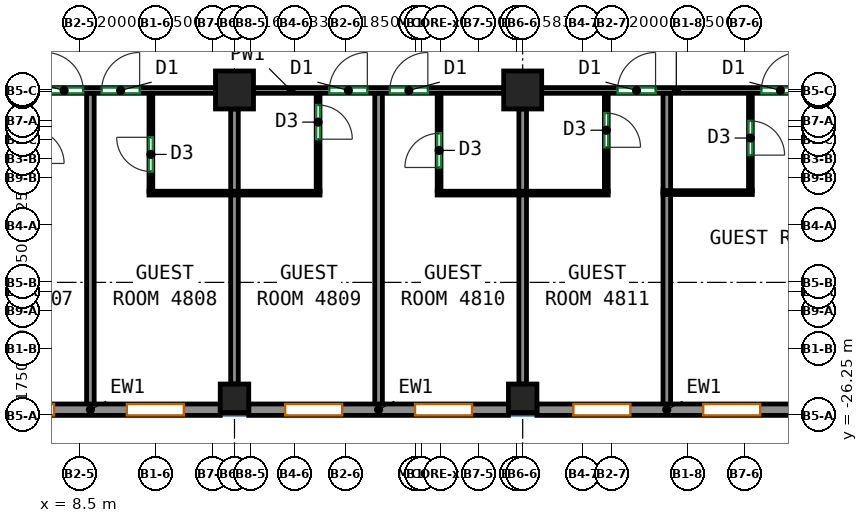
"""IFC4 building model, lengths in metres.
Left out: names, types, materials, properties, quantities, classifications, styles, units other than length and angle.
Written with IfcOpenShell. Run it as: python <this file> out.ifc"""

import sys

from ifc_helpers import new_model, si_unit, direction, frame, frame_2d, origin, origin_2d, place, context, subcontext, project, spatial, rectangle, extrude, source, transform, mapped, element, fill, save


model = new_model("IFC4")
c1 = context("Model", 3, precision=1e-05, world=origin(), true_north=direction((0.0, 1.0)))
c2 = subcontext(c1, "Body", "Model", "MODEL_VIEW")
j1 = project(units=[si_unit("LENGTHUNIT", "METRE"), si_unit("PLANEANGLEUNIT", "RADIAN")], contexts=[c1])
p1 = place(None, origin())
s1 = spatial("IfcSite", under=j1, at=p1, CompositionType="ELEMENT")
p2 = place(p1, origin())
s2 = spatial("IfcBuilding", under=s1, at=p2, CompositionType="ELEMENT")
p3 = place(p2, frame((0.0, 0.0, 199.9)))
s3 = spatial("IfcBuildingStorey", under=s2, at=p3, CompositionType="ELEMENT", Elevation=199.9)
m1 = source(origin(), c2, "Body", "SweptSolid", [
    extrude(rectangle(XDim=0.75, YDim=0.75, at=origin_2d()), origin(), (0.0, 0.0, 1.0), 3.12),
])
p4 = place(p3, frame((12.583, -25.8, 0.0), z_axis=(0.0, 0.0, 1.0), x_axis=(1.0, 0.0, 0.0)))
e1 = element("IfcColumn", 1, at=p4, inside=s3, PredefinedType="COLUMN", context=c2, shape_type="MappedRepresentation", body=[
    mapped(m1, transform((0.0, 0.0, 0.0))),
])
m2 = source(origin(), c2, "Body", "SweptSolid", [
    extrude(rectangle(XDim=1.0, YDim=1.0, at=origin_2d()), origin(), (0.0, 0.0, 1.0), 3.12),
])
p5 = place(p3, frame((12.583, -17.688, 0.0), z_axis=(0.0, 0.0, 1.0), x_axis=(1.0, 0.0, 0.0)))
e2 = element("IfcColumn", 2, at=p5, inside=s3, PredefinedType="COLUMN", context=c2, shape_type="MappedRepresentation", body=[
    mapped(m2, transform((0.0, 0.0, 0.0))),
])
p6 = place(p3, frame((20.167, -25.8, 0.0), z_axis=(0.0, 0.0, 1.0), x_axis=(1.0, 0.0, 0.0)))
e3 = element("IfcColumn", 3, at=p6, inside=s3, PredefinedType="COLUMN", context=c2, shape_type="MappedRepresentation", body=[
    mapped(m1, transform((0.0, 0.0, 0.0))),
])
p7 = place(p3, frame((20.167, -17.688, 0.0), z_axis=(0.0, 0.0, 1.0), x_axis=(1.0, 0.0, 0.0)))
e4 = element("IfcColumn", 4, at=p7, inside=s3, PredefinedType="COLUMN", context=c2, shape_type="MappedRepresentation", body=[
    mapped(m2, transform((0.0, 0.0, 0.0))),
])
m3 = source(origin(), c2, "Body", "SweptSolid", [
    extrude(rectangle(XDim=6.833, YDim=0.3, at=frame_2d((3.417, 0.0))), origin(), (0.0, 0.0, 1.0), 3.12),
])
p8 = place(p3, frame((5.375, -26.1, 0.0), z_axis=(0.0, 0.0, 1.0), x_axis=(1.0, 0.0, 0.0)))
e5 = element("IfcWall", 5, at=p8, inside=s3, PredefinedType="SOLIDWALL", context=c2, shape_type="MappedRepresentation", body=[
    mapped(m3, transform((0.0, 0.0, 0.0))),
])
p9 = place(p8, frame((0.958, 0.0, 0.85)))
e6 = element("IfcOpeningElement", 6, at=p9, cuts=e5, PredefinedType="OPENING", context=c2, shape_type="SweptSolid", body=[
    extrude(rectangle(XDim=1.5, YDim=1.95, at=frame_2d((0.75, 0.975))), frame((0.0, 0.16, 0.0), z_axis=(0.0, -1.0, 0.0), x_axis=(1.0, 0.0, 0.0)), (0.0, 0.0, 1.0), 0.32),
])
p10 = place(p8, frame((4.375, 0.0, 0.85)))
e7 = element("IfcOpeningElement", 7, at=p10, cuts=e5, PredefinedType="OPENING", context=c2, shape_type="SweptSolid", body=[
    extrude(rectangle(XDim=1.5, YDim=1.95, at=frame_2d((0.75, 0.975))), frame((0.0, 0.16, 0.0), z_axis=(0.0, -1.0, 0.0), x_axis=(1.0, 0.0, 0.0)), (0.0, 0.0, 1.0), 0.32),
])
m4 = source(origin(), c2, "Body", "SweptSolid", [
    extrude(rectangle(XDim=6.833, YDim=0.3, at=frame_2d((3.417, 0.0))), origin(), (0.0, 0.0, 1.0), 3.12),
])
p11 = place(p3, frame((12.958, -26.1, 0.0), z_axis=(0.0, 0.0, 1.0), x_axis=(1.0, 0.0, 0.0)))
e8 = element("IfcWall", 8, at=p11, inside=s3, PredefinedType="SOLIDWALL", context=c2, shape_type="MappedRepresentation", body=[
    mapped(m4, transform((0.0, 0.0, 0.0))),
])
p12 = place(p11, frame((0.958, 0.0, 0.85)))
e9 = element("IfcOpeningElement", 9, at=p12, cuts=e8, PredefinedType="OPENING", context=c2, shape_type="SweptSolid", body=[
    extrude(rectangle(XDim=1.5, YDim=1.95, at=frame_2d((0.75, 0.975))), frame((0.0, 0.16, 0.0), z_axis=(0.0, -1.0, 0.0), x_axis=(1.0, 0.0, 0.0)), (0.0, 0.0, 1.0), 0.32),
])
p13 = place(p11, frame((4.375, 0.0, 0.85)))
e10 = element("IfcOpeningElement", 10, at=p13, cuts=e8, PredefinedType="OPENING", context=c2, shape_type="SweptSolid", body=[
    extrude(rectangle(XDim=1.5, YDim=1.95, at=frame_2d((0.75, 0.975))), frame((0.0, 0.16, 0.0), z_axis=(0.0, -1.0, 0.0), x_axis=(1.0, 0.0, 0.0)), (0.0, 0.0, 1.0), 0.32),
])
p14 = place(p3, frame((20.542, -26.1, 0.0), z_axis=(0.0, 0.0, 1.0), x_axis=(1.0, 0.0, 0.0)))
e11 = element("IfcWall", 11, at=p14, inside=s3, PredefinedType="SOLIDWALL", context=c2, shape_type="MappedRepresentation", body=[
    mapped(m3, transform((0.0, 0.0, 0.0))),
])
p15 = place(p14, frame((0.958, 0.0, 0.85)))
e12 = element("IfcOpeningElement", 12, at=p15, cuts=e11, PredefinedType="OPENING", context=c2, shape_type="SweptSolid", body=[
    extrude(rectangle(XDim=1.5, YDim=1.95, at=frame_2d((0.75, 0.975))), frame((0.0, 0.16, 0.0), z_axis=(0.0, -1.0, 0.0), x_axis=(1.0, 0.0, 0.0)), (0.0, 0.0, 1.0), 0.32),
])
p16 = place(p14, frame((4.375, 0.0, 0.85)))
e13 = element("IfcOpeningElement", 13, at=p16, cuts=e11, PredefinedType="OPENING", context=c2, shape_type="SweptSolid", body=[
    extrude(rectangle(XDim=1.5, YDim=1.95, at=frame_2d((0.75, 0.975))), frame((0.0, 0.16, 0.0), z_axis=(0.0, -1.0, 0.0), x_axis=(1.0, 0.0, 0.0)), (0.0, 0.0, 1.0), 0.32),
])
p17 = place(p3, frame((5.5, -17.7, 0.0), z_axis=(0.0, 0.0, 1.0), x_axis=(1.0, 0.0, 0.0)))
e14 = element("IfcWall", 14, at=p17, inside=s3, PredefinedType="PARTITIONING", context=c2, shape_type="SweptSolid", body=[
    extrude(rectangle(XDim=6.583, YDim=0.15, at=frame_2d((3.292, 0.0))), origin(), (0.0, 0.0, 1.0), 3.12),
])
p18 = place(p17, frame((2.101, 0.0, 0.0)))
e15 = element("IfcOpeningElement", 15, at=p18, cuts=e14, PredefinedType="OPENING", context=c2, shape_type="SweptSolid", body=[
    extrude(rectangle(XDim=1.0, YDim=2.1, at=frame_2d((0.5, 1.05))), frame((0.0, 0.085, 0.0), z_axis=(0.0, -1.0, 0.0), x_axis=(1.0, 0.0, 0.0)), (0.0, 0.0, 1.0), 0.17),
])
p19 = place(p17, frame((3.587, 0.0, 0.0)))
e16 = element("IfcOpeningElement", 16, at=p19, cuts=e14, PredefinedType="OPENING", context=c2, shape_type="SweptSolid", body=[
    extrude(rectangle(XDim=1.0, YDim=2.1, at=frame_2d((0.5, 1.05))), frame((0.0, 0.085, 0.0), z_axis=(0.0, -1.0, 0.0), x_axis=(1.0, 0.0, 0.0)), (0.0, 0.0, 1.0), 0.17),
])
p20 = place(p3, frame((13.083, -17.7, 0.0), z_axis=(0.0, 0.0, 1.0), x_axis=(1.0, 0.0, 0.0)))
e17 = element("IfcWall", 17, at=p20, inside=s3, PredefinedType="PARTITIONING", context=c2, shape_type="SweptSolid", body=[
    extrude(rectangle(XDim=6.584, YDim=0.15, at=frame_2d((3.292, 0.0))), origin(), (0.0, 0.0, 1.0), 3.12),
])
p21 = place(p20, frame((1.996, 0.0, 0.0)))
e18 = element("IfcOpeningElement", 18, at=p21, cuts=e17, PredefinedType="OPENING", context=c2, shape_type="SweptSolid", body=[
    extrude(rectangle(XDim=1.0, YDim=2.1, at=frame_2d((0.5, 1.05))), frame((0.0, 0.085, 0.0), z_axis=(0.0, -1.0, 0.0), x_axis=(1.0, 0.0, 0.0)), (0.0, 0.0, 1.0), 0.17),
])
p22 = place(p20, frame((3.588, 0.0, 0.0)))
e19 = element("IfcOpeningElement", 19, at=p22, cuts=e17, PredefinedType="OPENING", context=c2, shape_type="SweptSolid", body=[
    extrude(rectangle(XDim=1.0, YDim=2.1, at=frame_2d((0.5, 1.05))), frame((0.0, 0.085, 0.0), z_axis=(0.0, -1.0, 0.0), x_axis=(1.0, 0.0, 0.0)), (0.0, 0.0, 1.0), 0.17),
])
p23 = place(p3, frame((20.667, -17.7, 0.0), z_axis=(0.0, 0.0, 1.0), x_axis=(1.0, 0.0, 0.0)))
e20 = element("IfcWall", 20, at=p23, inside=s3, PredefinedType="PARTITIONING", context=c2, shape_type="SweptSolid", body=[
    extrude(rectangle(XDim=7.083, YDim=0.15, at=frame_2d((3.542, 0.0))), origin(), (0.0, 0.0, 1.0), 2.52),
])
p24 = place(p23, frame((1.996, 0.0, 0.0)))
e21 = element("IfcOpeningElement", 21, at=p24, cuts=e20, PredefinedType="OPENING", context=c2, shape_type="SweptSolid", body=[
    extrude(rectangle(XDim=1.0, YDim=2.1, at=frame_2d((0.5, 1.05))), frame((0.0, 0.085, 0.0), z_axis=(0.0, -1.0, 0.0), x_axis=(1.0, 0.0, 0.0)), (0.0, 0.0, 1.0), 0.17),
])
p25 = place(p23, frame((5.782, 0.0, 0.0)))
e22 = element("IfcOpeningElement", 22, at=p25, cuts=e20, PredefinedType="OPENING", context=c2, shape_type="SweptSolid", body=[
    extrude(rectangle(XDim=1.0, YDim=2.1, at=frame_2d((0.5, 1.05))), frame((0.0, 0.085, 0.0), z_axis=(0.0, -1.0, 0.0), x_axis=(1.0, 0.0, 0.0)), (0.0, 0.0, 1.0), 0.17),
])
p26 = place(p3, frame((8.791, -26.0, 0.0), z_axis=(0.0, 0.0, 1.0), x_axis=(0.0, 1.0, 0.0)))
e23 = element("IfcWall", 23, at=p26, inside=s3, PredefinedType="PARTITIONING", context=c2, shape_type="SweptSolid", body=[
    extrude(rectangle(XDim=8.223, YDim=0.2, at=frame_2d((4.111, 0.0))), origin(), (0.0, 0.0, 1.0), 3.12),
])
p27 = place(p3, frame((10.383, -20.352, 0.0), z_axis=(0.0, 0.0, 1.0), x_axis=(0.0, 1.0, 0.0)))
e24 = element("IfcWall", 24, at=p27, inside=s3, PredefinedType="PARTITIONING", context=c2, shape_type="SweptSolid", body=[
    extrude(rectangle(XDim=2.575, YDim=0.1, at=frame_2d((1.288, 0.0))), origin(), (0.0, 0.0, 1.0), 3.12),
])
p28 = place(p27, frame((0.519, 0.0, 0.0)))
e25 = element("IfcOpeningElement", 25, at=p28, cuts=e24, PredefinedType="OPENING", context=c2, shape_type="SweptSolid", body=[
    extrude(rectangle(XDim=0.9, YDim=2.1, at=frame_2d((0.45, 1.05))), frame((0.0, 0.06, 0.0), z_axis=(0.0, -1.0, 0.0), x_axis=(1.0, 0.0, 0.0)), (0.0, 0.0, 1.0), 0.12),
])
p29 = place(p3, frame((10.333, -20.402, 0.0), z_axis=(0.0, 0.0, 1.0), x_axis=(1.0, 0.0, 0.0)))
e26 = element("IfcWall", 26, at=p29, inside=s3, PredefinedType="PARTITIONING", context=c2, shape_type="SweptSolid", body=[
    extrude(rectangle(XDim=4.5, YDim=0.1, at=frame_2d((2.25, 0.0))), origin(), (0.0, 0.0, 1.0), 3.12),
])
p30 = place(p3, frame((12.583, -25.425, 0.0), z_axis=(0.0, 0.0, 1.0), x_axis=(0.0, 1.0, 0.0)))
e27 = element("IfcWall", 27, at=p30, inside=s3, PredefinedType="PARTITIONING", context=c2, shape_type="SweptSolid", body=[
    extrude(rectangle(XDim=4.973, YDim=0.2, at=frame_2d((2.487, 0.0))), origin(), (0.0, 0.0, 1.0), 3.12),
])
p31 = place(p3, frame((12.583, -20.352, 0.0), z_axis=(0.0, 0.0, 1.0), x_axis=(0.0, 1.0, 0.0)))
e28 = element("IfcWall", 28, at=p31, inside=s3, PredefinedType="PARTITIONING", context=c2, shape_type="SweptSolid", body=[
    extrude(rectangle(XDim=2.164, YDim=0.2, at=frame_2d((1.082, 0.0))), origin(), (0.0, 0.0, 1.0), 3.12),
])
p32 = place(p3, frame((14.783, -17.777, 0.0), z_axis=(0.0, 0.0, 1.0), x_axis=(0.0, -1.0, 0.0)))
e29 = element("IfcWall", 29, at=p32, inside=s3, PredefinedType="PARTITIONING", context=c2, shape_type="SweptSolid", body=[
    extrude(rectangle(XDim=2.575, YDim=0.1, at=frame_2d((1.288, 0.0))), origin(), (0.0, 0.0, 1.0), 3.12),
])
p33 = place(p32, frame((0.306, 0.0, 0.0)))
e30 = element("IfcOpeningElement", 30, at=p33, cuts=e29, PredefinedType="OPENING", context=c2, shape_type="SweptSolid", body=[
    extrude(rectangle(XDim=0.9, YDim=2.1, at=frame_2d((0.45, 1.05))), frame((0.0, 0.06, 0.0), z_axis=(0.0, -1.0, 0.0), x_axis=(1.0, 0.0, 0.0)), (0.0, 0.0, 1.0), 0.12),
])
p34 = place(p3, frame((16.375, -26.0, 0.0), z_axis=(0.0, 0.0, 1.0), x_axis=(0.0, 1.0, 0.0)))
e31 = element("IfcWall", 31, at=p34, inside=s3, PredefinedType="PARTITIONING", context=c2, shape_type="SweptSolid", body=[
    extrude(rectangle(XDim=8.223, YDim=0.2, at=frame_2d((4.111, 0.0))), origin(), (0.0, 0.0, 1.0), 3.12),
])
p35 = place(p3, frame((17.967, -20.352, 0.0), z_axis=(0.0, 0.0, 1.0), x_axis=(0.0, 1.0, 0.0)))
e32 = element("IfcWall", 32, at=p35, inside=s3, PredefinedType="PARTITIONING", context=c2, shape_type="SweptSolid", body=[
    extrude(rectangle(XDim=2.575, YDim=0.1, at=frame_2d((1.288, 0.0))), origin(), (0.0, 0.0, 1.0), 3.12),
])
p36 = place(p35, frame((0.625, 0.0, 0.0)))
e33 = element("IfcOpeningElement", 33, at=p36, cuts=e32, PredefinedType="OPENING", context=c2, shape_type="SweptSolid", body=[
    extrude(rectangle(XDim=0.9, YDim=2.1, at=frame_2d((0.45, 1.05))), frame((0.0, 0.06, 0.0), z_axis=(0.0, -1.0, 0.0), x_axis=(1.0, 0.0, 0.0)), (0.0, 0.0, 1.0), 0.12),
])
p37 = place(p3, frame((17.917, -20.402, 0.0), z_axis=(0.0, 0.0, 1.0), x_axis=(1.0, 0.0, 0.0)))
e34 = element("IfcWall", 34, at=p37, inside=s3, PredefinedType="PARTITIONING", context=c2, shape_type="SweptSolid", body=[
    extrude(rectangle(XDim=4.5, YDim=0.1, at=frame_2d((2.25, 0.0))), origin(), (0.0, 0.0, 1.0), 3.12),
])
p38 = place(p3, frame((20.167, -25.425, 0.0), z_axis=(0.0, 0.0, 1.0), x_axis=(0.0, 1.0, 0.0)))
e35 = element("IfcWall", 35, at=p38, inside=s3, PredefinedType="PARTITIONING", context=c2, shape_type="SweptSolid", body=[
    extrude(rectangle(XDim=4.973, YDim=0.2, at=frame_2d((2.487, 0.0))), origin(), (0.0, 0.0, 1.0), 3.12),
])
p39 = place(p3, frame((20.167, -20.352, 0.0), z_axis=(0.0, 0.0, 1.0), x_axis=(0.0, 1.0, 0.0)))
e36 = element("IfcWall", 36, at=p39, inside=s3, PredefinedType="PARTITIONING", context=c2, shape_type="SweptSolid", body=[
    extrude(rectangle(XDim=2.164, YDim=0.2, at=frame_2d((1.082, 0.0))), origin(), (0.0, 0.0, 1.0), 3.12),
])
p40 = place(p3, frame((22.367, -17.777, 0.0), z_axis=(0.0, 0.0, 1.0), x_axis=(0.0, -1.0, 0.0)))
e37 = element("IfcWall", 37, at=p40, inside=s3, PredefinedType="PARTITIONING", context=c2, shape_type="SweptSolid", body=[
    extrude(rectangle(XDim=2.575, YDim=0.1, at=frame_2d((1.288, 0.0))), origin(), (0.0, 0.0, 1.0), 3.12),
])
p41 = place(p40, frame((0.519, 0.0, 0.0)))
e38 = element("IfcOpeningElement", 38, at=p41, cuts=e37, PredefinedType="OPENING", context=c2, shape_type="SweptSolid", body=[
    extrude(rectangle(XDim=0.9, YDim=2.1, at=frame_2d((0.45, 1.05))), frame((0.0, 0.06, 0.0), z_axis=(0.0, -1.0, 0.0), x_axis=(1.0, 0.0, 0.0)), (0.0, 0.0, 1.0), 0.12),
])
p42 = place(p3, frame((23.959, -26.0, 0.0), z_axis=(0.0, 0.0, 1.0), x_axis=(0.0, 1.0, 0.0)))
e39 = element("IfcWall", 39, at=p42, inside=s3, PredefinedType="PARTITIONING", context=c2, shape_type="SweptSolid", body=[
    extrude(rectangle(XDim=5.572, YDim=0.2, at=frame_2d((2.786, 0.0))), origin(), (0.0, 0.0, 1.0), 3.12),
])
p43 = place(p3, frame((23.959, -20.348, 0.0), z_axis=(0.0, 0.0, 1.0), x_axis=(0.0, 1.0, 0.0)))
e40 = element("IfcWall", 40, at=p43, inside=s3, PredefinedType="PARTITIONING", context=c2, shape_type="SweptSolid", body=[
    extrude(rectangle(XDim=2.571, YDim=0.2, at=frame_2d((1.285, 0.0))), origin(), (0.0, 0.0, 1.0), 3.12),
])
p44 = place(p3, frame((23.859, -20.388, 0.0), z_axis=(0.0, 0.0, 1.0), x_axis=(1.0, 0.0, 0.0)))
e41 = element("IfcWall", 41, at=p44, inside=s3, PredefinedType="PARTITIONING", context=c2, shape_type="SweptSolid", body=[
    extrude(rectangle(XDim=2.35, YDim=0.1, at=frame_2d((1.175, 0.0))), origin(), (0.0, 0.0, 1.0), 3.12),
])
p45 = place(p3, frame((26.159, -17.777, 0.0), z_axis=(0.0, 0.0, 1.0), x_axis=(0.0, -1.0, 0.0)))
e42 = element("IfcWall", 42, at=p45, inside=s3, PredefinedType="PARTITIONING", context=c2, shape_type="SweptSolid", body=[
    extrude(rectangle(XDim=2.561, YDim=0.1, at=frame_2d((1.28, 0.0))), origin(), (0.0, 0.0, 1.0), 3.12),
])
p46 = place(p45, frame((0.725, 0.0, 0.0)))
e43 = element("IfcOpeningElement", 43, at=p46, cuts=e42, PredefinedType="OPENING", context=c2, shape_type="SweptSolid", body=[
    extrude(rectangle(XDim=0.9, YDim=2.1, at=frame_2d((0.45, 1.05))), frame((0.0, 0.06, 0.0), z_axis=(0.0, -1.0, 0.0), x_axis=(1.0, 0.0, 0.0)), (0.0, 0.0, 1.0), 0.12),
])
p47 = place(p9, origin())
e44 = element("IfcWindow", 44, at=p47, inside=s3, PartitioningType="SINGLE_PANEL", PredefinedType="WINDOW", context=c2, shape_type="SweptSolid", body=[
    extrude(rectangle(XDim=1.5, YDim=1.95, at=frame_2d((0.75, 0.975))), frame((0.0, 0.03, 0.0), z_axis=(0.0, -1.0, 0.0), x_axis=(1.0, 0.0, 0.0)), (0.0, 0.0, 1.0), 0.06),
])
fill(e6, e44)
p48 = place(p10, origin())
e45 = element("IfcWindow", 45, at=p48, inside=s3, PartitioningType="SINGLE_PANEL", PredefinedType="WINDOW", context=c2, shape_type="SweptSolid", body=[
    extrude(rectangle(XDim=1.5, YDim=1.95, at=frame_2d((0.75, 0.975))), frame((0.0, 0.03, 0.0), z_axis=(0.0, -1.0, 0.0), x_axis=(1.0, 0.0, 0.0)), (0.0, 0.0, 1.0), 0.06),
])
fill(e7, e45)
p49 = place(p12, origin())
e46 = element("IfcWindow", 46, at=p49, inside=s3, PartitioningType="SINGLE_PANEL", PredefinedType="WINDOW", context=c2, shape_type="SweptSolid", body=[
    extrude(rectangle(XDim=1.5, YDim=1.95, at=frame_2d((0.75, 0.975))), frame((0.0, 0.03, 0.0), z_axis=(0.0, -1.0, 0.0), x_axis=(1.0, 0.0, 0.0)), (0.0, 0.0, 1.0), 0.06),
])
fill(e9, e46)
p50 = place(p13, origin())
e47 = element("IfcWindow", 47, at=p50, inside=s3, PartitioningType="SINGLE_PANEL", PredefinedType="WINDOW", context=c2, shape_type="SweptSolid", body=[
    extrude(rectangle(XDim=1.5, YDim=1.95, at=frame_2d((0.75, 0.975))), frame((0.0, 0.03, 0.0), z_axis=(0.0, -1.0, 0.0), x_axis=(1.0, 0.0, 0.0)), (0.0, 0.0, 1.0), 0.06),
])
fill(e10, e47)
p51 = place(p15, origin())
e48 = element("IfcWindow", 48, at=p51, inside=s3, PartitioningType="SINGLE_PANEL", PredefinedType="WINDOW", context=c2, shape_type="SweptSolid", body=[
    extrude(rectangle(XDim=1.5, YDim=1.95, at=frame_2d((0.75, 0.975))), frame((0.0, 0.03, 0.0), z_axis=(0.0, -1.0, 0.0), x_axis=(1.0, 0.0, 0.0)), (0.0, 0.0, 1.0), 0.06),
])
fill(e12, e48)
p52 = place(p16, origin())
e49 = element("IfcWindow", 49, at=p52, inside=s3, PartitioningType="SINGLE_PANEL", PredefinedType="WINDOW", context=c2, shape_type="SweptSolid", body=[
    extrude(rectangle(XDim=1.5, YDim=1.95, at=frame_2d((0.75, 0.975))), frame((0.0, 0.03, 0.0), z_axis=(0.0, -1.0, 0.0), x_axis=(1.0, 0.0, 0.0)), (0.0, 0.0, 1.0), 0.06),
])
fill(e13, e49)
p53 = place(p28, origin())
e50 = element("IfcDoor", 50, at=p53, inside=s3, OperationType="SINGLE_SWING_RIGHT", PredefinedType="DOOR", context=c2, shape_type="SweptSolid", body=[
    extrude(rectangle(XDim=0.9, YDim=2.1, at=frame_2d((0.45, 1.05))), frame((0.0, 0.025, 0.0), z_axis=(0.0, -1.0, 0.0), x_axis=(1.0, 0.0, 0.0)), (0.0, 0.0, 1.0), 0.05),
])
fill(e25, e50)
p54 = place(p36, origin())
e51 = element("IfcDoor", 51, at=p54, inside=s3, OperationType="SINGLE_SWING_LEFT", PredefinedType="DOOR", context=c2, shape_type="SweptSolid", body=[
    extrude(rectangle(XDim=0.9, YDim=2.1, at=frame_2d((0.45, 1.05))), frame((0.0, 0.025, 0.0), z_axis=(0.0, -1.0, 0.0), x_axis=(1.0, 0.0, 0.0)), (0.0, 0.0, 1.0), 0.05),
])
fill(e33, e51)
p55 = place(p46, origin())
e52 = element("IfcDoor", 52, at=p55, inside=s3, OperationType="SINGLE_SWING_RIGHT", PredefinedType="DOOR", context=c2, shape_type="SweptSolid", body=[
    extrude(rectangle(XDim=0.9, YDim=2.1, at=frame_2d((0.45, 1.05))), frame((0.0, 0.025, 0.0), z_axis=(0.0, -1.0, 0.0), x_axis=(1.0, 0.0, 0.0)), (0.0, 0.0, 1.0), 0.05),
])
fill(e43, e52)
p56 = place(p41, origin())
e53 = element("IfcDoor", 53, at=p56, inside=s3, OperationType="SINGLE_SWING_RIGHT", PredefinedType="DOOR", context=c2, shape_type="SweptSolid", body=[
    extrude(rectangle(XDim=0.9, YDim=2.1, at=frame_2d((0.45, 1.05))), frame((0.0, 0.025, 0.0), z_axis=(0.0, -1.0, 0.0), x_axis=(1.0, 0.0, 0.0)), (0.0, 0.0, 1.0), 0.05),
])
fill(e38, e53)
p57 = place(p33, origin())
e54 = element("IfcDoor", 54, at=p57, inside=s3, OperationType="SINGLE_SWING_RIGHT", PredefinedType="DOOR", context=c2, shape_type="SweptSolid", body=[
    extrude(rectangle(XDim=0.9, YDim=2.1, at=frame_2d((0.45, 1.05))), frame((0.0, 0.025, 0.0), z_axis=(0.0, -1.0, 0.0), x_axis=(1.0, 0.0, 0.0)), (0.0, 0.0, 1.0), 0.05),
])
fill(e30, e54)
p58 = place(p18, origin())
e55 = element("IfcDoor", 55, at=p58, inside=s3, OperationType="SINGLE_SWING_LEFT", PredefinedType="DOOR", context=c2, shape_type="SweptSolid", body=[
    extrude(rectangle(XDim=1.0, YDim=2.1, at=frame_2d((0.5, 1.05))), frame((0.0, 0.025, 0.0), z_axis=(0.0, -1.0, 0.0), x_axis=(1.0, 0.0, 0.0)), (0.0, 0.0, 1.0), 0.05),
])
fill(e15, e55)
p59 = place(p19, origin())
e56 = element("IfcDoor", 56, at=p59, inside=s3, OperationType="SINGLE_SWING_RIGHT", PredefinedType="DOOR", context=c2, shape_type="SweptSolid", body=[
    extrude(rectangle(XDim=1.0, YDim=2.1, at=frame_2d((0.5, 1.05))), frame((0.0, 0.025, 0.0), z_axis=(0.0, -1.0, 0.0), x_axis=(1.0, 0.0, 0.0)), (0.0, 0.0, 1.0), 0.05),
])
fill(e16, e56)
p60 = place(p21, origin())
e57 = element("IfcDoor", 57, at=p60, inside=s3, OperationType="SINGLE_SWING_RIGHT", PredefinedType="DOOR", context=c2, shape_type="SweptSolid", body=[
    extrude(rectangle(XDim=1.0, YDim=2.1, at=frame_2d((0.5, 1.05))), frame((0.0, 0.025, 0.0), z_axis=(0.0, -1.0, 0.0), x_axis=(1.0, 0.0, 0.0)), (0.0, 0.0, 1.0), 0.05),
])
fill(e18, e57)
p61 = place(p22, origin())
e58 = element("IfcDoor", 58, at=p61, inside=s3, OperationType="SINGLE_SWING_RIGHT", PredefinedType="DOOR", context=c2, shape_type="SweptSolid", body=[
    extrude(rectangle(XDim=1.0, YDim=2.1, at=frame_2d((0.5, 1.05))), frame((0.0, 0.025, 0.0), z_axis=(0.0, -1.0, 0.0), x_axis=(1.0, 0.0, 0.0)), (0.0, 0.0, 1.0), 0.05),
])
fill(e19, e58)
p62 = place(p24, origin())
e59 = element("IfcDoor", 59, at=p62, inside=s3, OperationType="SINGLE_SWING_RIGHT", PredefinedType="DOOR", context=c2, shape_type="SweptSolid", body=[
    extrude(rectangle(XDim=1.0, YDim=2.1, at=frame_2d((0.5, 1.05))), frame((0.0, 0.025, 0.0), z_axis=(0.0, -1.0, 0.0), x_axis=(1.0, 0.0, 0.0)), (0.0, 0.0, 1.0), 0.05),
])
fill(e21, e59)
p63 = place(p25, origin())
e60 = element("IfcDoor", 60, at=p63, inside=s3, OperationType="SINGLE_SWING_RIGHT", PredefinedType="DOOR", context=c2, shape_type="SweptSolid", body=[
    extrude(rectangle(XDim=1.0, YDim=2.1, at=frame_2d((0.5, 1.05))), frame((0.0, 0.025, 0.0), z_axis=(0.0, -1.0, 0.0), x_axis=(1.0, 0.0, 0.0)), (0.0, 0.0, 1.0), 0.05),
])
fill(e22, e60)
save(model, sys.argv[1])
